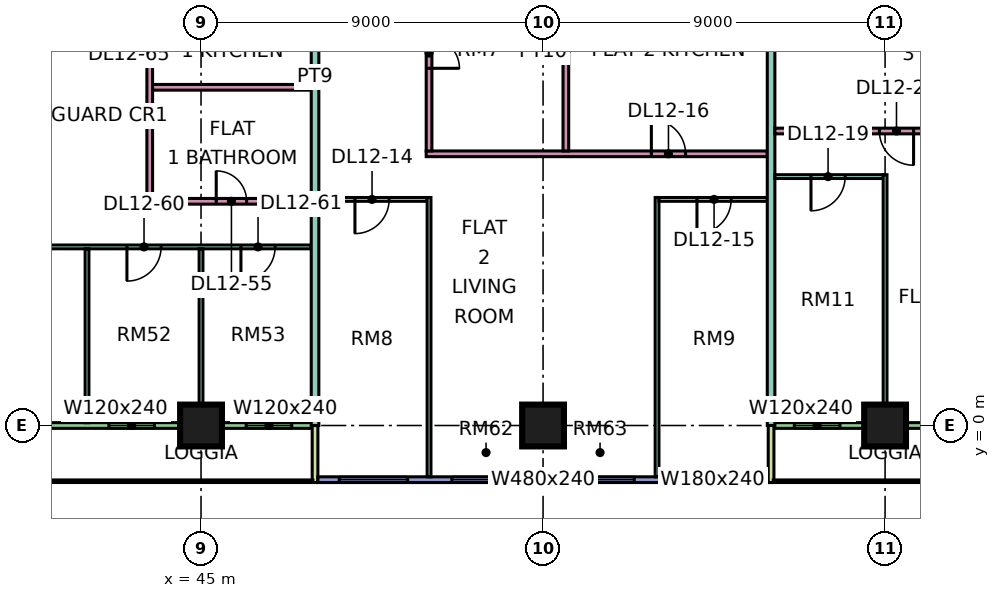
"""IFC4 building model, lengths in metres.
Left out: names, types, materials, properties, quantities, classifications, styles, units other than length and angle.
Written with IfcOpenShell. Run it as: python <this file> out.ifc"""

import sys

from ifc_helpers import new_model, si_unit, direction, frame, frame_2d, origin, origin_2d, place, context, subcontext, project, spatial, rectangle, extrude, element, fill, save


model = new_model("IFC4")
c1 = context("Model", 3, precision=1e-05, world=origin(), true_north=direction((0.0, 1.0)))
c2 = subcontext(c1, "Body", "Model", "MODEL_VIEW")
j1 = project(units=[si_unit("LENGTHUNIT", "METRE"), si_unit("PLANEANGLEUNIT", "RADIAN")], contexts=[c1])
p1 = place(None, origin())
s1 = spatial("IfcSite", under=j1, at=p1, CompositionType="ELEMENT")
p2 = place(p1, origin())
s2 = spatial("IfcBuilding", under=s1, at=p2, CompositionType="ELEMENT")
p3 = place(p2, frame((0.0, 0.0, 60.15)))
s3 = spatial("IfcBuildingStorey", under=s2, at=p3, CompositionType="ELEMENT", Elevation=60.15)
for number, where, z_axis, x_axis in (
    (1, (45.0, 0.0, 0.0), (0.0, 0.0, 1.0), (1.0, 0.0, 0.0)),
    (2, (54.0, 0.0, 0.0), (0.0, 0.0, 1.0), (1.0, 0.0, 0.0)),
    (3, (63.0, 0.0, 0.0), (0.0, 0.0, 1.0), (1.0, 0.0, 0.0)),
):
    element("IfcColumn", number, at=place(p3, frame(where, z_axis=z_axis, x_axis=x_axis)), inside=s3, PredefinedType="COLUMN", context=c2, shape_type="SweptSolid", body=[
        extrude(rectangle(XDim=1.1, YDim=1.1, at=origin_2d()), origin(), (0.0, 0.0, 1.0), 3.75),
    ])
p4 = place(p3, frame((36.075, 0.0, 0.0), z_axis=(0.0, 0.0, 1.0), x_axis=(1.0, 0.0, 0.0)))
e4 = element("IfcWall", 4, at=p4, inside=s3, PredefinedType="SOLIDWALL", context=c2, shape_type="SweptSolid", body=[
    extrude(rectangle(XDim=11.85, YDim=0.15, at=frame_2d((5.925, 0.0))), origin(), (0.0, 0.0, 1.0), 3.35),
])
p5 = place(p4, frame((2.35, 0.0, 0.0)))
e5 = element("IfcOpeningElement", 5, at=p5, cuts=e4, PredefinedType="OPENING", context=c2, shape_type="SweptSolid", body=[
    extrude(rectangle(XDim=1.8, YDim=2.4, at=frame_2d((0.9, 1.2))), frame((0.0, 0.085, 0.0), z_axis=(0.0, -1.0, 0.0), x_axis=(1.0, 0.0, 0.0)), (0.0, 0.0, 1.0), 0.17),
])
p6 = place(p4, frame((6.5, 0.0, 0.45)))
e6 = element("IfcOpeningElement", 6, at=p6, cuts=e4, PredefinedType="OPENING", context=c2, shape_type="SweptSolid", body=[
    extrude(rectangle(XDim=1.2, YDim=2.4, at=frame_2d((0.6, 1.2))), frame((0.0, 0.085, 0.0), z_axis=(0.0, -1.0, 0.0), x_axis=(1.0, 0.0, 0.0)), (0.0, 0.0, 1.0), 0.17),
])
p7 = place(p4, frame((10.113, 0.0, 0.45)))
e7 = element("IfcOpeningElement", 7, at=p7, cuts=e4, PredefinedType="OPENING", context=c2, shape_type="SweptSolid", body=[
    extrude(rectangle(XDim=1.2, YDim=2.4, at=frame_2d((0.6, 1.2))), frame((0.0, 0.085, 0.0), z_axis=(0.0, -1.0, 0.0), x_axis=(1.0, 0.0, 0.0)), (0.0, 0.0, 1.0), 0.17),
])
p8 = place(p3, frame((48.0, -1.5, 0.0), z_axis=(0.0, 0.0, 1.0), x_axis=(0.0, 1.0, 0.0)))
e8 = element("IfcWall", 8, at=p8, inside=s3, PredefinedType="SOLIDWALL", context=c2, shape_type="SweptSolid", body=[
    extrude(rectangle(XDim=1.5, YDim=0.15, at=frame_2d((0.75, 0.0))), origin(), (0.0, 0.0, 1.0), 3.35),
])
p9 = place(p3, frame((48.075, -1.425, 0.0), z_axis=(0.0, 0.0, 1.0), x_axis=(1.0, 0.0, 0.0)))
e9 = element("IfcWall", 9, at=p9, inside=s3, PredefinedType="SOLIDWALL", context=c2, shape_type="SweptSolid", body=[
    extrude(rectangle(XDim=11.85, YDim=0.15, at=frame_2d((5.925, 0.0))), origin(), (0.0, 0.0, 1.0), 3.35),
])
p10 = place(p9, frame((0.562, 0.0, 0.45)))
e10 = element("IfcOpeningElement", 10, at=p10, cuts=e9, PredefinedType="OPENING", context=c2, shape_type="SweptSolid", body=[
    extrude(rectangle(XDim=1.8, YDim=2.4, at=frame_2d((0.9, 1.2))), frame((0.0, 0.085, 0.0), z_axis=(0.0, -1.0, 0.0), x_axis=(1.0, 0.0, 0.0)), (0.0, 0.0, 1.0), 0.17),
])
p11 = place(p9, frame((3.525, 0.0, 0.45)))
e11 = element("IfcOpeningElement", 11, at=p11, cuts=e9, PredefinedType="OPENING", context=c2, shape_type="SweptSolid", body=[
    extrude(rectangle(XDim=4.8, YDim=2.4, at=frame_2d((2.4, 1.2))), frame((0.0, 0.085, 0.0), z_axis=(0.0, -1.0, 0.0), x_axis=(1.0, 0.0, 0.0)), (0.0, 0.0, 1.0), 0.17),
])
p12 = place(p9, frame((9.488, 0.0, 0.45)))
e12 = element("IfcOpeningElement", 12, at=p12, cuts=e9, PredefinedType="OPENING", context=c2, shape_type="SweptSolid", body=[
    extrude(rectangle(XDim=1.8, YDim=2.4, at=frame_2d((0.9, 1.2))), frame((0.0, 0.085, 0.0), z_axis=(0.0, -1.0, 0.0), x_axis=(1.0, 0.0, 0.0)), (0.0, 0.0, 1.0), 0.17),
])
p13 = place(p3, frame((60.075, 0.0, 0.0), z_axis=(0.0, 0.0, 1.0), x_axis=(1.0, 0.0, 0.0)))
e13 = element("IfcWall", 13, at=p13, inside=s3, PredefinedType="SOLIDWALL", context=c2, shape_type="SweptSolid", body=[
    extrude(rectangle(XDim=10.35, YDim=0.15, at=frame_2d((5.175, 0.0))), origin(), (0.0, 0.0, 1.0), 3.35),
])
p14 = place(p13, frame((0.538, 0.0, 0.45)))
e14 = element("IfcOpeningElement", 14, at=p14, cuts=e13, PredefinedType="OPENING", context=c2, shape_type="SweptSolid", body=[
    extrude(rectangle(XDim=1.2, YDim=2.4, at=frame_2d((0.6, 1.2))), frame((0.0, 0.085, 0.0), z_axis=(0.0, -1.0, 0.0), x_axis=(1.0, 0.0, 0.0)), (0.0, 0.0, 1.0), 0.17),
])
p15 = place(p13, frame((5.35, 0.0, 0.0)))
e15 = element("IfcOpeningElement", 15, at=p15, cuts=e13, PredefinedType="OPENING", context=c2, shape_type="SweptSolid", body=[
    extrude(rectangle(XDim=1.8, YDim=2.4, at=frame_2d((0.9, 1.2))), frame((0.0, 0.085, 0.0), z_axis=(0.0, -1.0, 0.0), x_axis=(1.0, 0.0, 0.0)), (0.0, 0.0, 1.0), 0.17),
])
p16 = place(p13, frame((9.188, 0.0, 0.45)))
e16 = element("IfcOpeningElement", 16, at=p16, cuts=e13, PredefinedType="OPENING", context=c2, shape_type="SweptSolid", body=[
    extrude(rectangle(XDim=0.9, YDim=2.4, at=frame_2d((0.45, 1.2))), frame((0.0, 0.085, 0.0), z_axis=(0.0, -1.0, 0.0), x_axis=(1.0, 0.0, 0.0)), (0.0, 0.0, 1.0), 0.17),
])
p17 = place(p3, frame((60.0, -1.5, 0.0), z_axis=(0.0, 0.0, 1.0), x_axis=(0.0, 1.0, 0.0)))
e17 = element("IfcWall", 17, at=p17, inside=s3, PredefinedType="SOLIDWALL", context=c2, shape_type="SweptSolid", body=[
    extrude(rectangle(XDim=1.5, YDim=0.15, at=frame_2d((0.75, 0.0))), origin(), (0.0, 0.0, 1.0), 3.35),
])
p18 = place(p3, frame((33.05, 4.7, 0.0), z_axis=(0.0, 0.0, 1.0), x_axis=(1.0, 0.0, 0.0)))
e18 = element("IfcWall", 18, at=p18, inside=s3, PredefinedType="PARTITIONING", context=c2, shape_type="SweptSolid", body=[
    extrude(rectangle(XDim=14.85, YDim=0.1, at=frame_2d((7.425, 0.0))), origin(), (0.0, 0.0, 1.0), 3.35),
])
p19 = place(p18, frame((10.0, 0.0, 0.0)))
e19 = element("IfcOpeningElement", 19, at=p19, cuts=e18, PredefinedType="OPENING", context=c2, shape_type="SweptSolid", body=[
    extrude(rectangle(XDim=0.9, YDim=2.1, at=frame_2d((0.45, 1.05))), frame((0.0, 0.06, 0.0), z_axis=(0.0, -1.0, 0.0), x_axis=(1.0, 0.0, 0.0)), (0.0, 0.0, 1.0), 0.12),
])
p20 = place(p18, frame((13.0, 0.0, 0.0)))
e20 = element("IfcOpeningElement", 20, at=p20, cuts=e18, PredefinedType="OPENING", context=c2, shape_type="SweptSolid", body=[
    extrude(rectangle(XDim=0.9, YDim=2.1, at=frame_2d((0.45, 1.05))), frame((0.0, 0.06, 0.0), z_axis=(0.0, -1.0, 0.0), x_axis=(1.0, 0.0, 0.0)), (0.0, 0.0, 1.0), 0.12),
])
p21 = place(p18, frame((4.0, 0.0, 0.0)))
e21 = element("IfcOpeningElement", 21, at=p21, cuts=e18, PredefinedType="OPENING", context=c2, shape_type="SweptSolid", body=[
    extrude(rectangle(XDim=0.9, YDim=2.1, at=frame_2d((0.45, 1.05))), frame((0.0, 0.06, 0.0), z_axis=(0.0, -1.0, 0.0), x_axis=(1.0, 0.0, 0.0)), (0.0, 0.0, 1.0), 0.12),
])
p22 = place(p3, frame((42.0, 0.074, 0.0), z_axis=(0.0, 0.0, 1.0), x_axis=(0.0, 1.0, 0.0)))
e22 = element("IfcWall", 22, at=p22, inside=s3, PredefinedType="PARTITIONING", context=c2, shape_type="SweptSolid", body=[
    extrude(rectangle(XDim=4.576, YDim=0.1, at=frame_2d((2.288, 0.0))), origin(), (0.0, 0.0, 1.0), 3.35),
])
p23 = place(p3, frame((43.65, 5.825, 0.0), z_axis=(0.0, 0.0, 1.0), x_axis=(0.0, 1.0, 0.0)))
e23 = element("IfcWall", 23, at=p23, inside=s3, PredefinedType="PARTITIONING", context=c2, shape_type="SweptSolid", body=[
    extrude(rectangle(XDim=6.625, YDim=0.15, at=frame_2d((3.312, 0.0))), origin(), (0.0, 0.0, 1.0), 3.35),
])
p24 = place(p23, frame((4.425, 0.0, 0.0)))
e24 = element("IfcOpeningElement", 24, at=p24, cuts=e23, PredefinedType="OPENING", context=c2, shape_type="SweptSolid", body=[
    extrude(rectangle(XDim=0.9, YDim=2.1, at=frame_2d((0.45, 1.05))), frame((0.0, 0.085, 0.0), z_axis=(0.0, -1.0, 0.0), x_axis=(1.0, 0.0, 0.0)), (0.0, 0.0, 1.0), 0.17),
])
p25 = place(p3, frame((43.725, 5.9, 0.0), z_axis=(0.0, 0.0, 1.0), x_axis=(1.0, 0.0, 0.0)))
e25 = element("IfcWall", 25, at=p25, inside=s3, PredefinedType="PARTITIONING", context=c2, shape_type="SweptSolid", body=[
    extrude(rectangle(XDim=4.175, YDim=0.15, at=frame_2d((2.087, 0.0))), origin(), (0.0, 0.0, 1.0), 3.35),
])
p26 = place(p25, frame((1.675, 0.0, 0.0)))
e26 = element("IfcOpeningElement", 26, at=p26, cuts=e25, PredefinedType="OPENING", context=c2, shape_type="SweptSolid", body=[
    extrude(rectangle(XDim=0.8, YDim=2.1, at=frame_2d((0.4, 1.05))), frame((0.0, 0.085, 0.0), z_axis=(0.0, -1.0, 0.0), x_axis=(1.0, 0.0, 0.0)), (0.0, 0.0, 1.0), 0.17),
])
p27 = place(p3, frame((43.725, 8.9, 0.0), z_axis=(0.0, 0.0, 1.0), x_axis=(1.0, 0.0, 0.0)))
e27 = element("IfcWall", 27, at=p27, inside=s3, PredefinedType="PARTITIONING", context=c2, shape_type="SweptSolid", body=[
    extrude(rectangle(XDim=4.175, YDim=0.15, at=frame_2d((2.087, 0.0))), origin(), (0.0, 0.0, 1.0), 3.35),
])
p28 = place(p3, frame((45.0, 0.074, 0.0), z_axis=(0.0, 0.0, 1.0), x_axis=(0.0, 1.0, 0.0)))
e28 = element("IfcWall", 28, at=p28, inside=s3, PredefinedType="PARTITIONING", context=c2, shape_type="SweptSolid", body=[
    extrude(rectangle(XDim=4.576, YDim=0.1, at=frame_2d((2.288, 0.0))), origin(), (0.0, 0.0, 1.0), 3.35),
])
p29 = place(p3, frame((48.0, 0.0, 0.0), z_axis=(0.0, 0.0, 1.0), x_axis=(0.0, 1.0, 0.0)))
e29 = element("IfcWall", 29, at=p29, inside=s3, PredefinedType="PARTITIONING", context=c2, shape_type="SweptSolid", body=[
    extrude(rectangle(XDim=5.975, YDim=0.2, at=frame_2d((2.988, 0.0))), origin(), (0.0, 0.0, 1.0), 3.35),
])
p30 = place(p3, frame((48.0, 5.9, 0.0), z_axis=(0.0, 0.0, 1.0), x_axis=(0.0, 1.0, 0.0)))
e30 = element("IfcWall", 30, at=p30, inside=s3, PredefinedType="PARTITIONING", context=c2, shape_type="SweptSolid", body=[
    extrude(rectangle(XDim=6.55, YDim=0.2, at=frame_2d((3.275, 0.0))), origin(), (0.0, 0.0, 1.0), 3.35),
])
p31 = place(p3, frame((48.1, 5.95, 0.0), z_axis=(0.0, 0.0, 1.0), x_axis=(1.0, 0.0, 0.0)))
e31 = element("IfcWall", 31, at=p31, inside=s3, PredefinedType="PARTITIONING", context=c2, shape_type="SweptSolid", body=[
    extrude(rectangle(XDim=2.85, YDim=0.1, at=frame_2d((1.425, 0.0))), origin(), (0.0, 0.0, 1.0), 3.35),
])
p32 = place(p31, frame((0.95, 0.0, 0.0)))
e32 = element("IfcOpeningElement", 32, at=p32, cuts=e31, PredefinedType="OPENING", context=c2, shape_type="SweptSolid", body=[
    extrude(rectangle(XDim=0.9, YDim=2.1, at=frame_2d((0.45, 1.05))), frame((0.0, 0.06, 0.0), z_axis=(0.0, -1.0, 0.0), x_axis=(1.0, 0.0, 0.0)), (0.0, 0.0, 1.0), 0.12),
])
p33 = place(p3, frame((50.925, 7.15, 0.0), z_axis=(0.0, 0.0, 1.0), x_axis=(1.0, 0.0, 0.0)))
e33 = element("IfcWall", 33, at=p33, inside=s3, PredefinedType="PARTITIONING", context=c2, shape_type="SweptSolid", body=[
    extrude(rectangle(XDim=8.975, YDim=0.15, at=frame_2d((4.487, 0.0))), origin(), (0.0, 0.0, 1.0), 3.35),
])
p34 = place(p33, frame((5.925, 0.0, 0.0)))
e34 = element("IfcOpeningElement", 34, at=p34, cuts=e33, PredefinedType="OPENING", context=c2, shape_type="SweptSolid", body=[
    extrude(rectangle(XDim=0.9, YDim=2.1, at=frame_2d((0.45, 1.05))), frame((0.0, 0.085, 0.0), z_axis=(0.0, -1.0, 0.0), x_axis=(1.0, 0.0, 0.0)), (0.0, 0.0, 1.0), 0.17),
])
p35 = place(p3, frame((51.0, -1.35, 0.0), z_axis=(0.0, 0.0, 1.0), x_axis=(0.0, 1.0, 0.0)))
e35 = element("IfcWall", 35, at=p35, inside=s3, PredefinedType="PARTITIONING", context=c2, shape_type="SweptSolid", body=[
    extrude(rectangle(XDim=7.35, YDim=0.1, at=frame_2d((3.675, 0.0))), origin(), (0.0, 0.0, 1.0), 3.35),
])
p36 = place(p3, frame((51.0, 7.225, 0.0), z_axis=(0.0, 0.0, 1.0), x_axis=(0.0, 1.0, 0.0)))
e36 = element("IfcWall", 36, at=p36, inside=s3, PredefinedType="PARTITIONING", context=c2, shape_type="SweptSolid", body=[
    extrude(rectangle(XDim=5.225, YDim=0.15, at=frame_2d((2.612, 0.0))), origin(), (0.0, 0.0, 1.0), 3.35),
])
p37 = place(p36, frame((2.175, 0.0, 0.0)))
e37 = element("IfcOpeningElement", 37, at=p37, cuts=e36, PredefinedType="OPENING", context=c2, shape_type="SweptSolid", body=[
    extrude(rectangle(XDim=0.8, YDim=2.1, at=frame_2d((0.4, 1.05))), frame((0.0, 0.085, 0.0), z_axis=(0.0, -1.0, 0.0), x_axis=(1.0, 0.0, 0.0)), (0.0, 0.0, 1.0), 0.17),
])
p38 = place(p3, frame((54.6, 7.225, 0.0), z_axis=(0.0, 0.0, 1.0), x_axis=(0.0, 1.0, 0.0)))
e38 = element("IfcWall", 38, at=p38, inside=s3, PredefinedType="PARTITIONING", context=c2, shape_type="SweptSolid", body=[
    extrude(rectangle(XDim=5.225, YDim=0.15, at=frame_2d((2.612, 0.0))), origin(), (0.0, 0.0, 1.0), 3.35),
])
p39 = place(p3, frame((57.0, -1.35, 0.0), z_axis=(0.0, 0.0, 1.0), x_axis=(0.0, 1.0, 0.0)))
e39 = element("IfcWall", 39, at=p39, inside=s3, PredefinedType="PARTITIONING", context=c2, shape_type="SweptSolid", body=[
    extrude(rectangle(XDim=7.35, YDim=0.1, at=frame_2d((3.675, 0.0))), origin(), (0.0, 0.0, 1.0), 3.35),
])
p40 = place(p3, frame((57.05, 5.95, 0.0), z_axis=(0.0, 0.0, 1.0), x_axis=(1.0, 0.0, 0.0)))
e40 = element("IfcWall", 40, at=p40, inside=s3, PredefinedType="PARTITIONING", context=c2, shape_type="SweptSolid", body=[
    extrude(rectangle(XDim=2.85, YDim=0.1, at=frame_2d((1.425, 0.0))), origin(), (0.0, 0.0, 1.0), 3.35),
])
p41 = place(p40, frame((1.0, 0.0, 0.0)))
e41 = element("IfcOpeningElement", 41, at=p41, cuts=e40, PredefinedType="OPENING", context=c2, shape_type="SweptSolid", body=[
    extrude(rectangle(XDim=0.9, YDim=2.1, at=frame_2d((0.45, 1.05))), frame((0.0, 0.06, 0.0), z_axis=(0.0, -1.0, 0.0), x_axis=(1.0, 0.0, 0.0)), (0.0, 0.0, 1.0), 0.12),
])
p42 = place(p3, frame((60.0, 0.0, 0.0), z_axis=(0.0, 0.0, 1.0), x_axis=(0.0, 1.0, 0.0)))
e42 = element("IfcWall", 42, at=p42, inside=s3, PredefinedType="PARTITIONING", context=c2, shape_type="SweptSolid", body=[
    extrude(rectangle(XDim=12.45, YDim=0.2, at=frame_2d((6.225, 0.0))), origin(), (0.0, 0.0, 1.0), 3.35),
])
p43 = place(p3, frame((60.1, 6.55, 0.0), z_axis=(0.0, 0.0, 1.0), x_axis=(1.0, 0.0, 0.0)))
e43 = element("IfcWall", 43, at=p43, inside=s3, PredefinedType="PARTITIONING", context=c2, shape_type="SweptSolid", body=[
    extrude(rectangle(XDim=2.85, YDim=0.1, at=frame_2d((1.425, 0.0))), origin(), (0.0, 0.0, 1.0), 3.35),
])
p44 = place(p43, frame((0.95, 0.0, 0.0)))
e44 = element("IfcOpeningElement", 44, at=p44, cuts=e43, PredefinedType="OPENING", context=c2, shape_type="SweptSolid", body=[
    extrude(rectangle(XDim=0.9, YDim=2.1, at=frame_2d((0.45, 1.05))), frame((0.0, 0.06, 0.0), z_axis=(0.0, -1.0, 0.0), x_axis=(1.0, 0.0, 0.0)), (0.0, 0.0, 1.0), 0.12),
])
p45 = place(p3, frame((60.1, 7.75, 0.0), z_axis=(0.0, 0.0, 1.0), x_axis=(1.0, 0.0, 0.0)))
e45 = element("IfcWall", 45, at=p45, inside=s3, PredefinedType="PARTITIONING", context=c2, shape_type="SweptSolid", body=[
    extrude(rectangle(XDim=9.575, YDim=0.15, at=frame_2d((4.788, 0.0))), origin(), (0.0, 0.0, 1.0), 3.35),
])
p46 = place(p45, frame((7.65, 0.0, 0.0)))
e46 = element("IfcOpeningElement", 46, at=p46, cuts=e45, PredefinedType="OPENING", context=c2, shape_type="SweptSolid", body=[
    extrude(rectangle(XDim=0.8, YDim=2.1, at=frame_2d((0.4, 1.05))), frame((0.0, 0.085, 0.0), z_axis=(0.0, -1.0, 0.0), x_axis=(1.0, 0.0, 0.0)), (0.0, 0.0, 1.0), 0.17),
])
p47 = place(p45, frame((2.75, 0.0, 0.0)))
e47 = element("IfcOpeningElement", 47, at=p47, cuts=e45, PredefinedType="OPENING", context=c2, shape_type="SweptSolid", body=[
    extrude(rectangle(XDim=0.9, YDim=2.1, at=frame_2d((0.45, 1.05))), frame((0.0, 0.085, 0.0), z_axis=(0.0, -1.0, 0.0), x_axis=(1.0, 0.0, 0.0)), (0.0, 0.0, 1.0), 0.17),
])
p48 = place(p3, frame((63.0, 0.074, 0.0), z_axis=(0.0, 0.0, 1.0), x_axis=(0.0, 1.0, 0.0)))
e48 = element("IfcWall", 48, at=p48, inside=s3, PredefinedType="PARTITIONING", context=c2, shape_type="SweptSolid", body=[
    extrude(rectangle(XDim=6.526, YDim=0.1, at=frame_2d((3.263, 0.0))), origin(), (0.0, 0.0, 1.0), 3.35),
])
p49 = place(p6, origin())
e49 = element("IfcWindow", 49, at=p49, inside=s3, PartitioningType="SINGLE_PANEL", PredefinedType="WINDOW", context=c2, shape_type="SweptSolid", body=[
    extrude(rectangle(XDim=1.2, YDim=2.4, at=frame_2d((0.6, 1.2))), frame((0.0, 0.03, 0.0), z_axis=(0.0, -1.0, 0.0), x_axis=(1.0, 0.0, 0.0)), (0.0, 0.0, 1.0), 0.06),
])
fill(e6, e49)
p50 = place(p7, origin())
e50 = element("IfcWindow", 50, at=p50, inside=s3, PartitioningType="SINGLE_PANEL", PredefinedType="WINDOW", context=c2, shape_type="SweptSolid", body=[
    extrude(rectangle(XDim=1.2, YDim=2.4, at=frame_2d((0.6, 1.2))), frame((0.0, 0.03, 0.0), z_axis=(0.0, -1.0, 0.0), x_axis=(1.0, 0.0, 0.0)), (0.0, 0.0, 1.0), 0.06),
])
fill(e7, e50)
p51 = place(p10, origin())
e51 = element("IfcWindow", 51, at=p51, inside=s3, PartitioningType="SINGLE_PANEL", PredefinedType="WINDOW", context=c2, shape_type="SweptSolid", body=[
    extrude(rectangle(XDim=1.8, YDim=2.4, at=frame_2d((0.9, 1.2))), frame((0.0, 0.03, 0.0), z_axis=(0.0, -1.0, 0.0), x_axis=(1.0, 0.0, 0.0)), (0.0, 0.0, 1.0), 0.06),
])
fill(e10, e51)
p52 = place(p11, origin())
e52 = element("IfcWindow", 52, at=p52, inside=s3, PartitioningType="SINGLE_PANEL", PredefinedType="WINDOW", context=c2, shape_type="SweptSolid", body=[
    extrude(rectangle(XDim=4.8, YDim=2.4, at=frame_2d((2.4, 1.2))), frame((0.0, 0.03, 0.0), z_axis=(0.0, -1.0, 0.0), x_axis=(1.0, 0.0, 0.0)), (0.0, 0.0, 1.0), 0.06),
])
fill(e11, e52)
p53 = place(p12, origin())
e53 = element("IfcWindow", 53, at=p53, inside=s3, PartitioningType="SINGLE_PANEL", PredefinedType="WINDOW", context=c2, shape_type="SweptSolid", body=[
    extrude(rectangle(XDim=1.8, YDim=2.4, at=frame_2d((0.9, 1.2))), frame((0.0, 0.03, 0.0), z_axis=(0.0, -1.0, 0.0), x_axis=(1.0, 0.0, 0.0)), (0.0, 0.0, 1.0), 0.06),
])
fill(e12, e53)
p54 = place(p14, origin())
e54 = element("IfcWindow", 54, at=p54, inside=s3, PartitioningType="SINGLE_PANEL", PredefinedType="WINDOW", context=c2, shape_type="SweptSolid", body=[
    extrude(rectangle(XDim=1.2, YDim=2.4, at=frame_2d((0.6, 1.2))), frame((0.0, 0.03, 0.0), z_axis=(0.0, -1.0, 0.0), x_axis=(1.0, 0.0, 0.0)), (0.0, 0.0, 1.0), 0.06),
])
fill(e14, e54)
p55 = place(p37, frame((0.8, 0.0, 0.0), z_axis=(0.0, 0.0, 1.0), x_axis=(-1.0, 0.0, 0.0)))
e55 = element("IfcDoor", 55, at=p55, inside=s3, OperationType="SINGLE_SWING_LEFT", PredefinedType="DOOR", context=c2, shape_type="SweptSolid", body=[
    extrude(rectangle(XDim=0.8, YDim=2.1, at=frame_2d((0.4, 1.05))), frame((0.0, 0.025, 0.0), z_axis=(0.0, -1.0, 0.0), x_axis=(1.0, 0.0, 0.0)), (0.0, 0.0, 1.0), 0.05),
])
fill(e37, e55)
p56 = place(p32, frame((0.9, 0.0, 0.0), z_axis=(0.0, 0.0, 1.0), x_axis=(-1.0, 0.0, 0.0)))
e56 = element("IfcDoor", 56, at=p56, inside=s3, OperationType="SINGLE_SWING_LEFT", PredefinedType="DOOR", context=c2, shape_type="SweptSolid", body=[
    extrude(rectangle(XDim=0.9, YDim=2.1, at=frame_2d((0.45, 1.05))), frame((0.0, 0.025, 0.0), z_axis=(0.0, -1.0, 0.0), x_axis=(1.0, 0.0, 0.0)), (0.0, 0.0, 1.0), 0.05),
])
fill(e32, e56)
p57 = place(p41, frame((0.9, 0.0, 0.0), z_axis=(0.0, 0.0, 1.0), x_axis=(-1.0, 0.0, 0.0)))
e57 = element("IfcDoor", 57, at=p57, inside=s3, OperationType="SINGLE_SWING_LEFT", PredefinedType="DOOR", context=c2, shape_type="SweptSolid", body=[
    extrude(rectangle(XDim=0.9, YDim=2.1, at=frame_2d((0.45, 1.05))), frame((0.0, 0.025, 0.0), z_axis=(0.0, -1.0, 0.0), x_axis=(1.0, 0.0, 0.0)), (0.0, 0.0, 1.0), 0.05),
])
fill(e41, e57)
p58 = place(p34, origin())
e58 = element("IfcDoor", 58, at=p58, inside=s3, OperationType="SINGLE_SWING_LEFT", PredefinedType="DOOR", context=c2, shape_type="SweptSolid", body=[
    extrude(rectangle(XDim=0.9, YDim=2.1, at=frame_2d((0.45, 1.05))), frame((0.0, 0.025, 0.0), z_axis=(0.0, -1.0, 0.0), x_axis=(1.0, 0.0, 0.0)), (0.0, 0.0, 1.0), 0.05),
])
fill(e34, e58)
p59 = place(p44, frame((0.9, 0.0, 0.0), z_axis=(0.0, 0.0, 1.0), x_axis=(-1.0, 0.0, 0.0)))
e59 = element("IfcDoor", 59, at=p59, inside=s3, OperationType="SINGLE_SWING_LEFT", PredefinedType="DOOR", context=c2, shape_type="SweptSolid", body=[
    extrude(rectangle(XDim=0.9, YDim=2.1, at=frame_2d((0.45, 1.05))), frame((0.0, 0.025, 0.0), z_axis=(0.0, -1.0, 0.0), x_axis=(1.0, 0.0, 0.0)), (0.0, 0.0, 1.0), 0.05),
])
fill(e44, e59)
p60 = place(p47, origin())
e60 = element("IfcDoor", 60, at=p60, inside=s3, OperationType="SINGLE_SWING_RIGHT", PredefinedType="DOOR", context=c2, shape_type="SweptSolid", body=[
    extrude(rectangle(XDim=0.9, YDim=2.1, at=frame_2d((0.45, 1.05))), frame((0.0, 0.025, 0.0), z_axis=(0.0, -1.0, 0.0), x_axis=(1.0, 0.0, 0.0)), (0.0, 0.0, 1.0), 0.05),
])
fill(e47, e60)
p61 = place(p26, origin())
e61 = element("IfcDoor", 61, at=p61, inside=s3, OperationType="SINGLE_SWING_LEFT", PredefinedType="DOOR", context=c2, shape_type="SweptSolid", body=[
    extrude(rectangle(XDim=0.8, YDim=2.1, at=frame_2d((0.4, 1.05))), frame((0.0, 0.025, 0.0), z_axis=(0.0, -1.0, 0.0), x_axis=(1.0, 0.0, 0.0)), (0.0, 0.0, 1.0), 0.05),
])
fill(e26, e61)
p62 = place(p19, frame((0.9, 0.0, 0.0), z_axis=(0.0, 0.0, 1.0), x_axis=(-1.0, 0.0, 0.0)))
e62 = element("IfcDoor", 62, at=p62, inside=s3, OperationType="SINGLE_SWING_LEFT", PredefinedType="DOOR", context=c2, shape_type="SweptSolid", body=[
    extrude(rectangle(XDim=0.9, YDim=2.1, at=frame_2d((0.45, 1.05))), frame((0.0, 0.025, 0.0), z_axis=(0.0, -1.0, 0.0), x_axis=(1.0, 0.0, 0.0)), (0.0, 0.0, 1.0), 0.05),
])
fill(e19, e62)
p63 = place(p20, frame((0.9, 0.0, 0.0), z_axis=(0.0, 0.0, 1.0), x_axis=(-1.0, 0.0, 0.0)))
e63 = element("IfcDoor", 63, at=p63, inside=s3, OperationType="SINGLE_SWING_LEFT", PredefinedType="DOOR", context=c2, shape_type="SweptSolid", body=[
    extrude(rectangle(XDim=0.9, YDim=2.1, at=frame_2d((0.45, 1.05))), frame((0.0, 0.025, 0.0), z_axis=(0.0, -1.0, 0.0), x_axis=(1.0, 0.0, 0.0)), (0.0, 0.0, 1.0), 0.05),
])
fill(e20, e63)
save(model, sys.argv[1])
